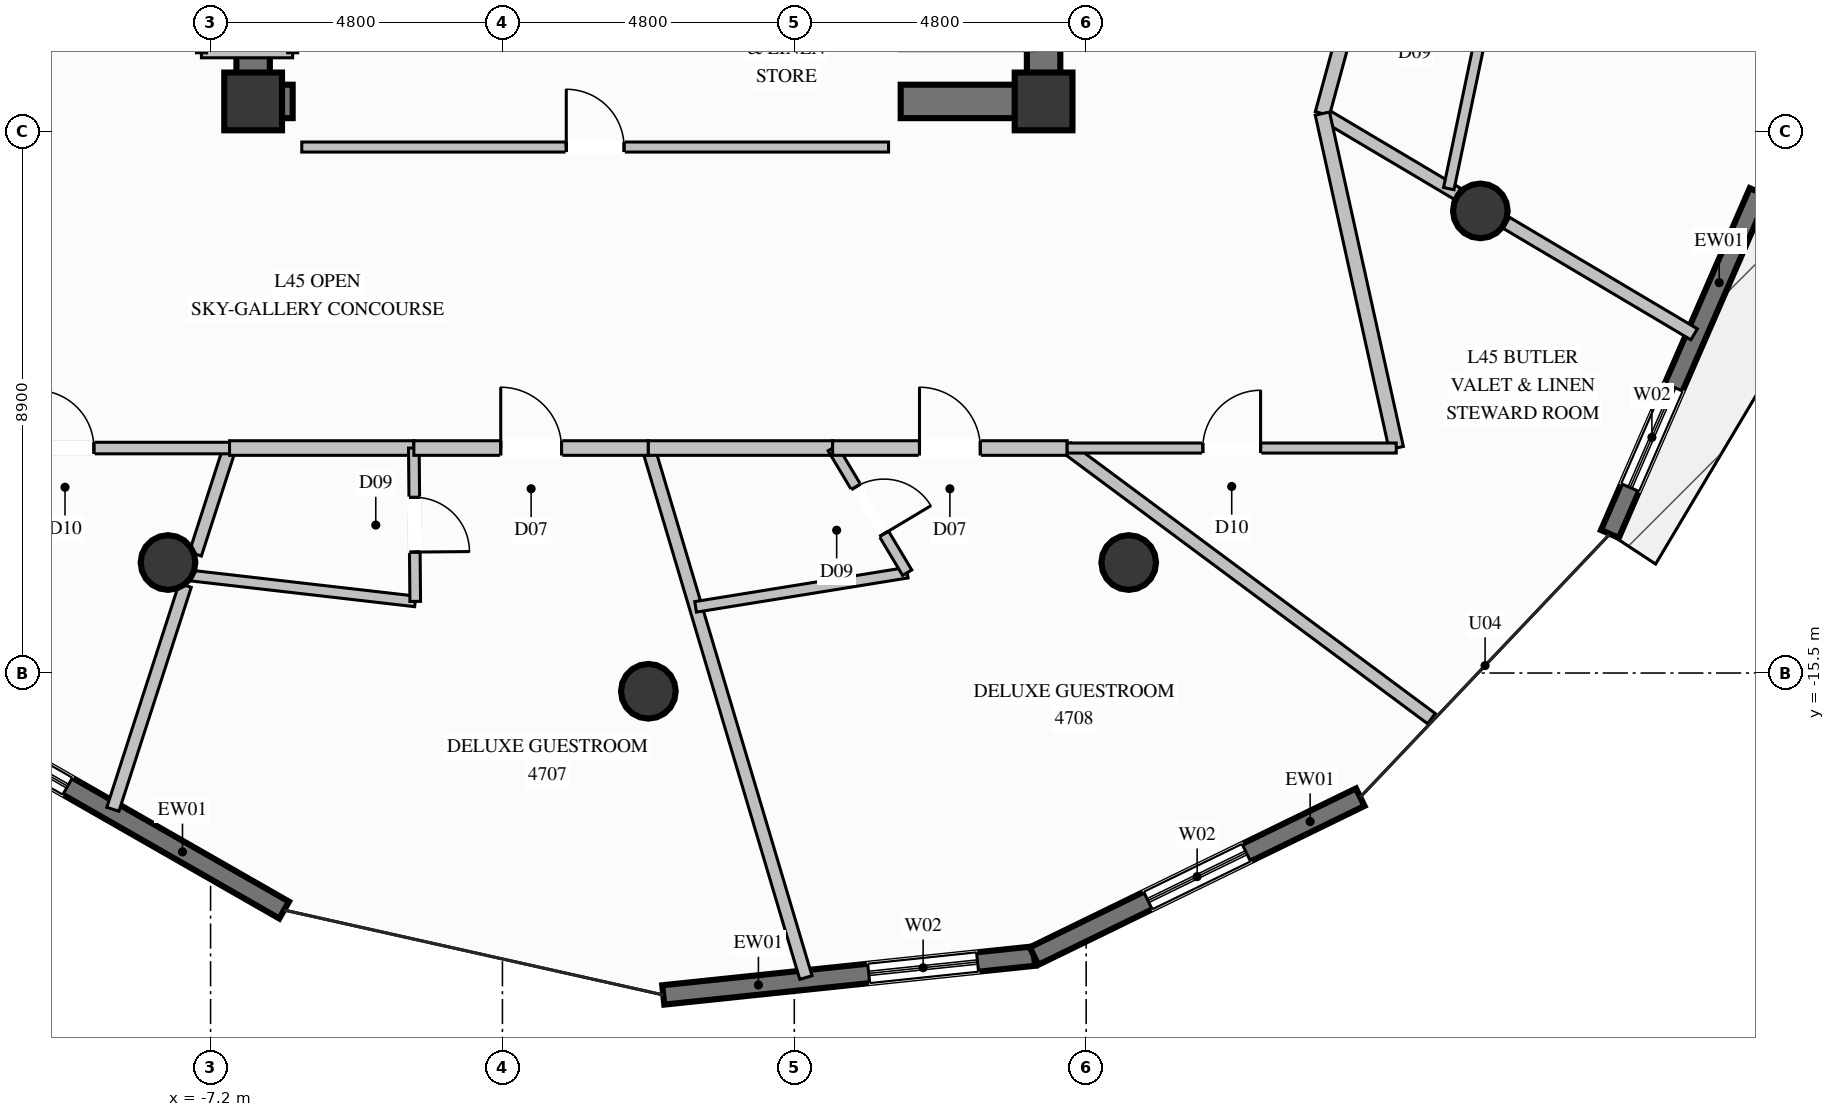
"""IFC4 building model, lengths in metres.
Left out: names, types, materials, properties, quantities, classifications, styles, units other than length and angle.
Written with IfcOpenShell. Run it as: python <this file> out.ifc"""

import sys

from ifc_helpers import new_model, si_unit, direction, frame, frame_2d, origin, origin_2d, place, context, subcontext, project, spatial, rectangle, circle, extrude, element, fill, save


model = new_model("IFC4")
c1 = context("Model", 3, precision=1e-05, world=origin(), true_north=direction((0.0, 1.0)))
c2 = subcontext(c1, "Body", "Model", "MODEL_VIEW")
j1 = project(units=[si_unit("LENGTHUNIT", "METRE"), si_unit("PLANEANGLEUNIT", "RADIAN")], contexts=[c1])
p1 = place(None, origin())
s1 = spatial("IfcSite", under=j1, at=p1, CompositionType="ELEMENT")
p2 = place(p1, origin())
s2 = spatial("IfcBuilding", under=s1, at=p2, CompositionType="ELEMENT")
p3 = place(p2, frame((0.0, 0.0, 176.8)))
s3 = spatial("IfcBuildingStorey", under=s2, at=p3, CompositionType="ELEMENT", Elevation=176.8)
for number, where, z_axis, x_axis in (
    (1, (-6.5, -6.1, 0.0), (0.0, 0.0, 1.0), (1.0, 0.0, 0.0)),
    (2, (6.5, -6.1, 0.0), (0.0, 0.0, 1.0), (1.0, 0.0, 0.0)),
):
    element("IfcColumn", number, at=place(p3, frame(where, z_axis=z_axis, x_axis=x_axis)), inside=s3, PredefinedType="COLUMN", context=c2, shape_type="SweptSolid", body=[
        extrude(rectangle(XDim=0.95, YDim=0.95, at=origin_2d()), origin(), (0.0, 0.0, 1.0), 3.6),
    ])
p4 = place(p3, frame((-6.225, -6.1, 0.0), z_axis=(0.0, 0.0, 1.0), x_axis=(1.0, 0.0, 0.0)))
e3 = element("IfcWall", 3, at=p4, inside=s3, PredefinedType="SHEAR", context=c2, shape_type="SweptSolid", body=[
    extrude(rectangle(XDim=0.375, YDim=0.55, at=frame_2d((0.188, 0.0))), origin(), (0.0, 0.0, 1.0), 3.6),
])
p5 = place(p3, frame((4.15, -6.1, 0.0), z_axis=(0.0, 0.0, 1.0), x_axis=(1.0, 0.0, 0.0)))
e4 = element("IfcWall", 4, at=p5, inside=s3, PredefinedType="SHEAR", context=c2, shape_type="SweptSolid", body=[
    extrude(rectangle(XDim=2.075, YDim=0.55, at=frame_2d((1.038, 0.0))), origin(), (0.0, 0.0, 1.0), 3.6),
])
p6 = place(p3, frame((-6.5, -6.375, 0.0), z_axis=(0.0, 0.0, 1.0), x_axis=(0.0, 1.0, 0.0)))
e5 = element("IfcWall", 5, at=p6, inside=s3, PredefinedType="SHEAR", context=c2, shape_type="SweptSolid", body=[
    extrude(rectangle(XDim=3.025, YDim=0.55, at=frame_2d((1.512, 0.0))), origin(), (0.0, 0.0, 1.0), 3.6),
])
p7 = place(p3, frame((6.5, -6.375, 0.0), z_axis=(0.0, 0.0, 1.0), x_axis=(0.0, 1.0, 0.0)))
e6 = element("IfcWall", 6, at=p7, inside=s3, PredefinedType="SHEAR", context=c2, shape_type="SweptSolid", body=[
    extrude(rectangle(XDim=4.025, YDim=0.55, at=frame_2d((2.012, 0.0))), origin(), (0.0, 0.0, 1.0), 3.6),
])
for number, where, z_axis, x_axis in (
    (7, (-7.9, -13.683, 0.0), (0.0, 0.0, 1.0), (1.0, 0.0, 0.0)),
    (8, (0.0, -15.8, 0.0), (0.0, 0.0, 1.0), (1.0, 0.0, 0.0)),
    (9, (7.9, -13.683, 0.0), (0.0, 0.0, 1.0), (1.0, 0.0, 0.0)),
    (10, (13.683, -7.9, 0.0), (0.0, 0.0, 1.0), (1.0, 0.0, 0.0)),
):
    element("IfcColumn", number, at=place(p3, frame(where, z_axis=z_axis, x_axis=x_axis)), inside=s3, PredefinedType="COLUMN", context=c2, shape_type="SweptSolid", body=[
        extrude(circle(Radius=0.45, at=origin_2d()), origin(), (0.0, 0.0, 1.0), 3.6),
    ])
p8 = place(p3, frame((18.26, -7.59, 0.0), z_axis=(0.0, 0.0, 1.0), x_axis=(-0.398911001453, -0.916989647117, 0.0)))
e11 = element("IfcWall", 11, at=p8, inside=s3, PredefinedType="SOLIDWALL", context=c2, shape_type="SweptSolid", body=[
    extrude(rectangle(XDim=6.132, YDim=0.32, at=frame_2d((3.066, 0.0))), origin(), (0.0, 0.0, 1.0), 3.36),
])
p9 = place(p8, frame((3.5, 0.0, 0.35)))
e12 = element("IfcOpeningElement", 12, at=p9, cuts=e11, PredefinedType="OPENING", context=c2, shape_type="SweptSolid", body=[
    extrude(rectangle(XDim=1.8, YDim=2.6, at=frame_2d((0.9, 1.3))), frame((0.0, 0.17, 0.0), z_axis=(0.0, -1.0, 0.0), x_axis=(1.0, 0.0, 0.0)), (0.0, 0.0, 1.0), 0.34),
])
p10 = place(p3, frame((-5.99, -19.398, 0.0), z_axis=(0.0, 0.0, 1.0), x_axis=(-0.868052920032, 0.496471678974, 0.0)))
e13 = element("IfcWall", 13, at=p10, inside=s3, PredefinedType="SOLIDWALL", context=c2, shape_type="SweptSolid", body=[
    extrude(rectangle(XDim=6.637, YDim=0.32, at=frame_2d((3.318, 0.0))), origin(), (0.0, 0.0, 1.0), 3.36),
])
p11 = place(p10, frame((4.102, 0.0, 0.35)))
e14 = element("IfcOpeningElement", 14, at=p11, cuts=e13, PredefinedType="OPENING", context=c2, shape_type="SweptSolid", body=[
    extrude(rectangle(XDim=1.8, YDim=2.6, at=frame_2d((0.9, 1.3))), frame((0.0, 0.17, 0.0), z_axis=(0.0, -1.0, 0.0), x_axis=(1.0, 0.0, 0.0)), (0.0, 0.0, 1.0), 0.34),
])
p12 = place(p3, frame((6.343, -20.155, 0.0), z_axis=(0.0, 0.0, 1.0), x_axis=(-0.994555738522, -0.104205964195, 0.0)))
e15 = element("IfcWall", 15, at=p12, inside=s3, PredefinedType="SOLIDWALL", context=c2, shape_type="SweptSolid", body=[
    extrude(rectangle(XDim=6.131, YDim=0.32, at=frame_2d((3.066, 0.0))), origin(), (0.0, 0.0, 1.0), 3.36),
])
p13 = place(p12, frame((0.934, 0.0, 0.35)))
e16 = element("IfcOpeningElement", 16, at=p13, cuts=e15, PredefinedType="OPENING", context=c2, shape_type="SweptSolid", body=[
    extrude(rectangle(XDim=1.8, YDim=2.6, at=frame_2d((0.9, 1.3))), frame((0.0, 0.17, 0.0), z_axis=(0.0, -1.0, 0.0), x_axis=(1.0, 0.0, 0.0)), (0.0, 0.0, 1.0), 0.34),
])
p14 = place(p3, frame((11.708, -17.542, 0.0), z_axis=(0.0, 0.0, 1.0), x_axis=(-0.899034471399, -0.437877858811, 0.0)))
e17 = element("IfcWall", 17, at=p14, inside=s3, PredefinedType="SOLIDWALL", context=c2, shape_type="SweptSolid", body=[
    extrude(rectangle(XDim=5.968, YDim=0.32, at=frame_2d((2.984, 0.0))), origin(), (0.0, 0.0, 1.0), 3.36),
])
p15 = place(p14, frame((2.084, 0.0, 0.35)))
e18 = element("IfcOpeningElement", 18, at=p15, cuts=e17, PredefinedType="OPENING", context=c2, shape_type="SweptSolid", body=[
    extrude(rectangle(XDim=1.8, YDim=2.6, at=frame_2d((0.9, 1.3))), frame((0.0, 0.17, 0.0), z_axis=(0.0, -1.0, 0.0), x_axis=(1.0, 0.0, 0.0)), (0.0, 0.0, 1.0), 0.34),
])
p16 = place(p3, frame((-7.35, -5.3, 0.0), z_axis=(0.0, 0.0, 1.0), x_axis=(1.0, 0.0, 0.0)))
e19 = element("IfcWall", 19, at=p16, inside=s3, PredefinedType="PARTITIONING", context=c2, shape_type="SweptSolid", body=[
    extrude(rectangle(XDim=1.5, YDim=0.165, at=frame_2d((0.75, 0.0))), origin(), (0.0, 0.0, 1.0), 2.445),
])
p17 = place(p3, frame((-5.7, -6.85, 0.0), z_axis=(0.0, 0.0, 1.0), x_axis=(1.0, 0.0, 0.0)))
e20 = element("IfcWall", 20, at=p17, inside=s3, PredefinedType="PARTITIONING", context=c2, shape_type="SweptSolid", body=[
    extrude(rectangle(XDim=9.65, YDim=0.165, at=frame_2d((4.825, 0.0))), origin(), (0.0, 0.0, 1.0), 2.445),
])
p18 = place(p17, frame((4.35, 0.0, 0.0)))
e21 = element("IfcOpeningElement", 21, at=p18, cuts=e20, PredefinedType="OPENING", context=c2, shape_type="SweptSolid", body=[
    extrude(rectangle(XDim=0.95, YDim=2.1, at=frame_2d((0.475, 1.05))), frame((0.0, 0.093, 0.0), z_axis=(0.0, -1.0, 0.0), x_axis=(1.0, 0.0, 0.0)), (0.0, 0.0, 1.0), 0.185),
])
p19 = place(p3, frame((11.085, -6.3, 0.0), z_axis=(0.0, 0.0, 1.0), x_axis=(0.859827513331, -0.510584613281, 0.0)))
e22 = element("IfcWall", 22, at=p19, inside=s3, PredefinedType="PARTITIONING", context=c2, shape_type="SweptSolid", body=[
    extrude(rectangle(XDim=2.583, YDim=0.21, at=frame_2d((1.292, 0.0))), origin(), (0.0, 0.0, 1.0), 2.876),
])
p20 = place(p3, frame((14.11, -8.096, 0.0), z_axis=(0.0, 0.0, 1.0), x_axis=(0.859858473155, -0.510532473153, 0.0)))
e23 = element("IfcWall", 23, at=p20, inside=s3, PredefinedType="PARTITIONING", context=c2, shape_type="SweptSolid", body=[
    extrude(rectangle(XDim=3.592, YDim=0.21, at=frame_2d((1.796, 0.0))), origin(), (0.0, 0.0, 1.0), 3.36),
])
p21 = place(p3, frame((11.085, -6.3, 0.0), z_axis=(0.0, 0.0, 1.0), x_axis=(0.262552356383, 0.964917747872, 0.0)))
e24 = element("IfcWall", 24, at=p21, inside=s3, PredefinedType="PARTITIONING", context=c2, shape_type="SweptSolid", body=[
    extrude(rectangle(XDim=2.742, YDim=0.24, at=frame_2d((1.371, 0.0))), origin(), (0.0, 0.0, 1.0), 3.36),
])
p22 = place(p3, frame((13.164, -7.534, 0.0), z_axis=(0.0, 0.0, 1.0), x_axis=(0.204476064812, 0.978871564057, 0.0)))
e25 = element("IfcWall", 25, at=p22, inside=s3, PredefinedType="PLUMBINGWALL", context=c2, shape_type="SweptSolid", body=[
    extrude(rectangle(XDim=3.232, YDim=0.175, at=frame_2d((1.616, 0.0))), origin(), (0.0, 0.0, 1.0), 2.929),
])
p23 = place(p3, frame((-6.888, -11.8, 0.0), z_axis=(0.0, 0.0, 1.0), x_axis=(-0.307220756357, -0.95163827522, 0.0)))
e26 = element("IfcWall", 26, at=p23, inside=s3, PredefinedType="PARTITIONING", context=c2, shape_type="SweptSolid", body=[
    extrude(rectangle(XDim=1.833, YDim=0.21, at=frame_2d((0.916, 0.0))), origin(), (0.0, 0.0, 1.0), 2.876),
])
p24 = place(p3, frame((-7.618, -14.059, 0.0), z_axis=(0.0, 0.0, 1.0), x_axis=(-0.307297747986, -0.9516134163, 0.0)))
e27 = element("IfcWall", 27, at=p24, inside=s3, PredefinedType="PARTITIONING", context=c2, shape_type="SweptSolid", body=[
    extrude(rectangle(XDim=3.869, YDim=0.21, at=frame_2d((1.935, 0.0))), origin(), (0.0, 0.0, 1.0), 3.36),
])
p25 = place(p3, frame((-12.3, -11.8, 0.0), z_axis=(0.0, 0.0, 1.0), x_axis=(1.0, 0.0, 0.0)))
e28 = element("IfcWall", 28, at=p25, inside=s3, PredefinedType="PARTITIONING", context=c2, shape_type="SweptSolid", body=[
    extrude(rectangle(XDim=5.412, YDim=0.19, at=frame_2d((2.706, 0.0))), origin(), (0.0, 0.0, 1.0), 3.36),
])
p26 = place(p25, frame((2.231, 0.0, 0.0)))
e29 = element("IfcOpeningElement", 29, at=p26, cuts=e28, PredefinedType="OPENING", context=c2, shape_type="SweptSolid", body=[
    extrude(rectangle(XDim=0.95, YDim=2.1, at=frame_2d((0.475, 1.05))), frame((0.0, 0.105, 0.0), z_axis=(0.0, -1.0, 0.0), x_axis=(1.0, 0.0, 0.0)), (0.0, 0.0, 1.0), 0.21),
])
p27 = place(p3, frame((-6.888, -11.8, 0.0), z_axis=(0.0, 0.0, 1.0), x_axis=(1.0, 0.0, 0.0)))
e30 = element("IfcWall", 30, at=p27, inside=s3, PredefinedType="PARTITIONING", context=c2, shape_type="SweptSolid", body=[
    extrude(rectangle(XDim=3.031, YDim=0.24, at=frame_2d((1.516, 0.0))), origin(), (0.0, 0.0, 1.0), 3.36),
])
p28 = place(p3, frame((-7.564, -13.893, 0.0), z_axis=(0.0, 0.0, 1.0), x_axis=(0.993452151759, -0.114248948203, 0.0)))
e31 = element("IfcWall", 31, at=p28, inside=s3, PredefinedType="PLUMBINGWALL", context=c2, shape_type="SweptSolid", body=[
    extrude(rectangle(XDim=3.755, YDim=0.175, at=frame_2d((1.877, 0.0))), origin(), (0.0, 0.0, 1.0), 2.929),
])
p29 = place(p3, frame((-3.857, -11.8, 0.0), z_axis=(0.0, 0.0, 1.0), x_axis=(0.009099332858, -0.999958600214, 0.0)))
e32 = element("IfcWall", 32, at=p29, inside=s3, PredefinedType="PLUMBINGWALL", context=c2, shape_type="SweptSolid", body=[
    extrude(rectangle(XDim=2.522, YDim=0.175, at=frame_2d((1.261, 0.0))), origin(), (0.0, 0.0, 1.0), 3.36),
])
p30 = place(p29, frame((0.811, 0.0, 0.0)))
e33 = element("IfcOpeningElement", 33, at=p30, cuts=e32, PredefinedType="OPENING", context=c2, shape_type="SweptSolid", body=[
    extrude(rectangle(XDim=0.9, YDim=2.1, at=frame_2d((0.45, 1.05))), frame((0.0, 0.098, 0.0), z_axis=(0.0, -1.0, 0.0), x_axis=(1.0, 0.0, 0.0)), (0.0, 0.0, 1.0), 0.195),
])
p31 = place(p3, frame((0.0, -11.8, 0.0), z_axis=(0.0, 0.0, 1.0), x_axis=(0.285192468368, -0.958470268702, 0.0)))
e34 = element("IfcWall", 34, at=p31, inside=s3, PredefinedType="PARTITIONING", context=c2, shape_type="SweptSolid", body=[
    extrude(rectangle(XDim=9.085, YDim=0.21, at=frame_2d((4.542, 0.0))), origin(), (0.0, 0.0, 1.0), 3.36),
])
p32 = place(p3, frame((-3.857, -11.8, 0.0), z_axis=(0.0, 0.0, 1.0), x_axis=(1.0, 0.0, 0.0)))
e35 = element("IfcWall", 35, at=p32, inside=s3, PredefinedType="PARTITIONING", context=c2, shape_type="SweptSolid", body=[
    extrude(rectangle(XDim=3.857, YDim=0.24, at=frame_2d((1.928, 0.0))), origin(), (0.0, 0.0, 1.0), 3.36),
])
p33 = place(p32, frame((1.429, 0.0, 0.0)))
e36 = element("IfcOpeningElement", 36, at=p33, cuts=e35, PredefinedType="OPENING", context=c2, shape_type="SweptSolid", body=[
    extrude(rectangle(XDim=1.0, YDim=2.2, at=frame_2d((0.5, 1.1))), frame((0.0, 0.13, 0.0), z_axis=(0.0, -1.0, 0.0), x_axis=(1.0, 0.0, 0.0)), (0.0, 0.0, 1.0), 0.26),
])
p34 = place(p3, frame((0.0, -11.8, 0.0), z_axis=(0.0, 0.0, 1.0), x_axis=(1.0, 0.0, 0.0)))
e37 = element("IfcWall", 37, at=p34, inside=s3, PredefinedType="PARTITIONING", context=c2, shape_type="SweptSolid", body=[
    extrude(rectangle(XDim=3.031, YDim=0.24, at=frame_2d((1.516, 0.0))), origin(), (0.0, 0.0, 1.0), 3.36),
])
p35 = place(p3, frame((0.777, -14.412, 0.0), z_axis=(0.0, 0.0, 1.0), x_axis=(0.987208789181, 0.159432765027, 0.0)))
e38 = element("IfcWall", 38, at=p35, inside=s3, PredefinedType="PLUMBINGWALL", context=c2, shape_type="SweptSolid", body=[
    extrude(rectangle(XDim=3.525, YDim=0.175, at=frame_2d((1.763, 0.0))), origin(), (0.0, 0.0, 1.0), 3.36),
])
p36 = place(p3, frame((3.031, -11.8, 0.0), z_axis=(0.0, 0.0, 1.0), x_axis=(0.513277784821, -0.858222532685, 0.0)))
e39 = element("IfcWall", 39, at=p36, inside=s3, PredefinedType="PLUMBINGWALL", context=c2, shape_type="SweptSolid", body=[
    extrude(rectangle(XDim=2.389, YDim=0.175, at=frame_2d((1.194, 0.0))), origin(), (0.0, 0.0, 1.0), 3.36),
])
p37 = place(p36, frame((0.744, 0.0, 0.0)))
e40 = element("IfcOpeningElement", 40, at=p37, cuts=e39, PredefinedType="OPENING", context=c2, shape_type="SweptSolid", body=[
    extrude(rectangle(XDim=0.9, YDim=2.1, at=frame_2d((0.45, 1.05))), frame((0.0, 0.098, 0.0), z_axis=(0.0, -1.0, 0.0), x_axis=(1.0, 0.0, 0.0)), (0.0, 0.0, 1.0), 0.195),
])
p38 = place(p3, frame((6.888, -11.8, 0.0), z_axis=(0.0, 0.0, 1.0), x_axis=(0.802774719759, -0.596282440892, 0.0)))
e41 = element("IfcWall", 41, at=p38, inside=s3, PredefinedType="PARTITIONING", context=c2, shape_type="SweptSolid", body=[
    extrude(rectangle(XDim=7.463, YDim=0.21, at=frame_2d((3.731, 0.0))), origin(), (0.0, 0.0, 1.0), 3.36),
])
p39 = place(p3, frame((3.031, -11.8, 0.0), z_axis=(0.0, 0.0, 1.0), x_axis=(1.0, 0.0, 0.0)))
e42 = element("IfcWall", 42, at=p39, inside=s3, PredefinedType="PARTITIONING", context=c2, shape_type="SweptSolid", body=[
    extrude(rectangle(XDim=3.857, YDim=0.24, at=frame_2d((1.928, 0.0))), origin(), (0.0, 0.0, 1.0), 3.36),
])
p40 = place(p39, frame((1.428, 0.0, 0.0)))
e43 = element("IfcOpeningElement", 43, at=p40, cuts=e42, PredefinedType="OPENING", context=c2, shape_type="SweptSolid", body=[
    extrude(rectangle(XDim=1.0, YDim=2.2, at=frame_2d((0.5, 1.1))), frame((0.0, 0.13, 0.0), z_axis=(0.0, -1.0, 0.0), x_axis=(1.0, 0.0, 0.0)), (0.0, 0.0, 1.0), 0.26),
])
p41 = place(p3, frame((12.3, -11.8, 0.0), z_axis=(0.0, 0.0, 1.0), x_axis=(-0.21572328796, 0.976454537104, 0.0)))
e44 = element("IfcWall", 44, at=p41, inside=s3, PredefinedType="PARTITIONING", context=c2, shape_type="SweptSolid", body=[
    extrude(rectangle(XDim=5.633, YDim=0.24, at=frame_2d((2.816, 0.0))), origin(), (0.0, 0.0, 1.0), 3.36),
])
p42 = place(p3, frame((6.888, -11.8, 0.0), z_axis=(0.0, 0.0, 1.0), x_axis=(1.0, 0.0, 0.0)))
e45 = element("IfcWall", 45, at=p42, inside=s3, PredefinedType="PARTITIONING", context=c2, shape_type="SweptSolid", body=[
    extrude(rectangle(XDim=5.412, YDim=0.165, at=frame_2d((2.706, 0.0))), origin(), (0.0, 0.0, 1.0), 3.36),
])
p43 = place(p42, frame((2.231, 0.0, 0.0)))
e46 = element("IfcOpeningElement", 46, at=p43, cuts=e45, PredefinedType="OPENING", context=c2, shape_type="SweptSolid", body=[
    extrude(rectangle(XDim=0.95, YDim=2.1, at=frame_2d((0.475, 1.05))), frame((0.0, 0.093, 0.0), z_axis=(0.0, -1.0, 0.0), x_axis=(1.0, 0.0, 0.0)), (0.0, 0.0, 1.0), 0.185),
])
p44 = place(p9, origin())
e47 = element("IfcWindow", 47, at=p44, inside=s3, PartitioningType="SINGLE_PANEL", PredefinedType="WINDOW", context=c2, shape_type="SweptSolid", body=[
    extrude(rectangle(XDim=1.8, YDim=2.6, at=frame_2d((0.9, 1.3))), frame((0.0, 0.03, 0.0), z_axis=(0.0, -1.0, 0.0), x_axis=(1.0, 0.0, 0.0)), (0.0, 0.0, 1.0), 0.06),
])
fill(e12, e47)
p45 = place(p11, origin())
e48 = element("IfcWindow", 48, at=p45, inside=s3, PartitioningType="SINGLE_PANEL", PredefinedType="WINDOW", context=c2, shape_type="SweptSolid", body=[
    extrude(rectangle(XDim=1.8, YDim=2.6, at=frame_2d((0.9, 1.3))), frame((0.0, 0.03, 0.0), z_axis=(0.0, -1.0, 0.0), x_axis=(1.0, 0.0, 0.0)), (0.0, 0.0, 1.0), 0.06),
])
fill(e14, e48)
p46 = place(p13, origin())
e49 = element("IfcWindow", 49, at=p46, inside=s3, PartitioningType="SINGLE_PANEL", PredefinedType="WINDOW", context=c2, shape_type="SweptSolid", body=[
    extrude(rectangle(XDim=1.8, YDim=2.6, at=frame_2d((0.9, 1.3))), frame((0.0, 0.03, 0.0), z_axis=(0.0, -1.0, 0.0), x_axis=(1.0, 0.0, 0.0)), (0.0, 0.0, 1.0), 0.06),
])
fill(e16, e49)
p47 = place(p15, origin())
e50 = element("IfcWindow", 50, at=p47, inside=s3, PartitioningType="SINGLE_PANEL", PredefinedType="WINDOW", context=c2, shape_type="SweptSolid", body=[
    extrude(rectangle(XDim=1.8, YDim=2.6, at=frame_2d((0.9, 1.3))), frame((0.0, 0.03, 0.0), z_axis=(0.0, -1.0, 0.0), x_axis=(1.0, 0.0, 0.0)), (0.0, 0.0, 1.0), 0.06),
])
fill(e18, e50)
p48 = place(p18, origin())
e51 = element("IfcDoor", 51, at=p48, inside=s3, OperationType="SINGLE_SWING_LEFT", PredefinedType="DOOR", context=c2, shape_type="SweptSolid", body=[
    extrude(rectangle(XDim=0.95, YDim=2.1, at=frame_2d((0.475, 1.05))), frame((0.0, 0.025, 0.0), z_axis=(0.0, -1.0, 0.0), x_axis=(1.0, 0.0, 0.0)), (0.0, 0.0, 1.0), 0.05),
])
fill(e21, e51)
p49 = place(p26, origin())
e52 = element("IfcDoor", 52, at=p49, inside=s3, OperationType="SINGLE_SWING_LEFT", PredefinedType="DOOR", context=c2, shape_type="SweptSolid", body=[
    extrude(rectangle(XDim=0.95, YDim=2.1, at=frame_2d((0.475, 1.05))), frame((0.0, 0.025, 0.0), z_axis=(0.0, -1.0, 0.0), x_axis=(1.0, 0.0, 0.0)), (0.0, 0.0, 1.0), 0.05),
])
fill(e29, e52)
p50 = place(p30, origin())
e53 = element("IfcDoor", 53, at=p50, inside=s3, OperationType="SINGLE_SWING_RIGHT", PredefinedType="DOOR", context=c2, shape_type="SweptSolid", body=[
    extrude(rectangle(XDim=0.9, YDim=2.1, at=frame_2d((0.45, 1.05))), frame((0.0, 0.025, 0.0), z_axis=(0.0, -1.0, 0.0), x_axis=(1.0, 0.0, 0.0)), (0.0, 0.0, 1.0), 0.05),
])
fill(e33, e53)
p51 = place(p33, origin())
e54 = element("IfcDoor", 54, at=p51, inside=s3, OperationType="SINGLE_SWING_LEFT", PredefinedType="DOOR", context=c2, shape_type="SweptSolid", body=[
    extrude(rectangle(XDim=1.0, YDim=2.2, at=frame_2d((0.5, 1.1))), frame((0.0, 0.025, 0.0), z_axis=(0.0, -1.0, 0.0), x_axis=(1.0, 0.0, 0.0)), (0.0, 0.0, 1.0), 0.05),
])
fill(e36, e54)
p52 = place(p37, origin())
e55 = element("IfcDoor", 55, at=p52, inside=s3, OperationType="SINGLE_SWING_RIGHT", PredefinedType="DOOR", context=c2, shape_type="SweptSolid", body=[
    extrude(rectangle(XDim=0.9, YDim=2.1, at=frame_2d((0.45, 1.05))), frame((0.0, 0.025, 0.0), z_axis=(0.0, -1.0, 0.0), x_axis=(1.0, 0.0, 0.0)), (0.0, 0.0, 1.0), 0.05),
])
fill(e40, e55)
p53 = place(p40, origin())
e56 = element("IfcDoor", 56, at=p53, inside=s3, OperationType="SINGLE_SWING_LEFT", PredefinedType="DOOR", context=c2, shape_type="SweptSolid", body=[
    extrude(rectangle(XDim=1.0, YDim=2.2, at=frame_2d((0.5, 1.1))), frame((0.0, 0.025, 0.0), z_axis=(0.0, -1.0, 0.0), x_axis=(1.0, 0.0, 0.0)), (0.0, 0.0, 1.0), 0.05),
])
fill(e43, e56)
p54 = place(p43, origin())
e57 = element("IfcDoor", 57, at=p54, inside=s3, OperationType="SINGLE_SWING_RIGHT", PredefinedType="DOOR", context=c2, shape_type="SweptSolid", body=[
    extrude(rectangle(XDim=0.95, YDim=2.1, at=frame_2d((0.475, 1.05))), frame((0.0, 0.025, 0.0), z_axis=(0.0, -1.0, 0.0), x_axis=(1.0, 0.0, 0.0)), (0.0, 0.0, 1.0), 0.05),
])
fill(e46, e57)
save(model, sys.argv[1])
